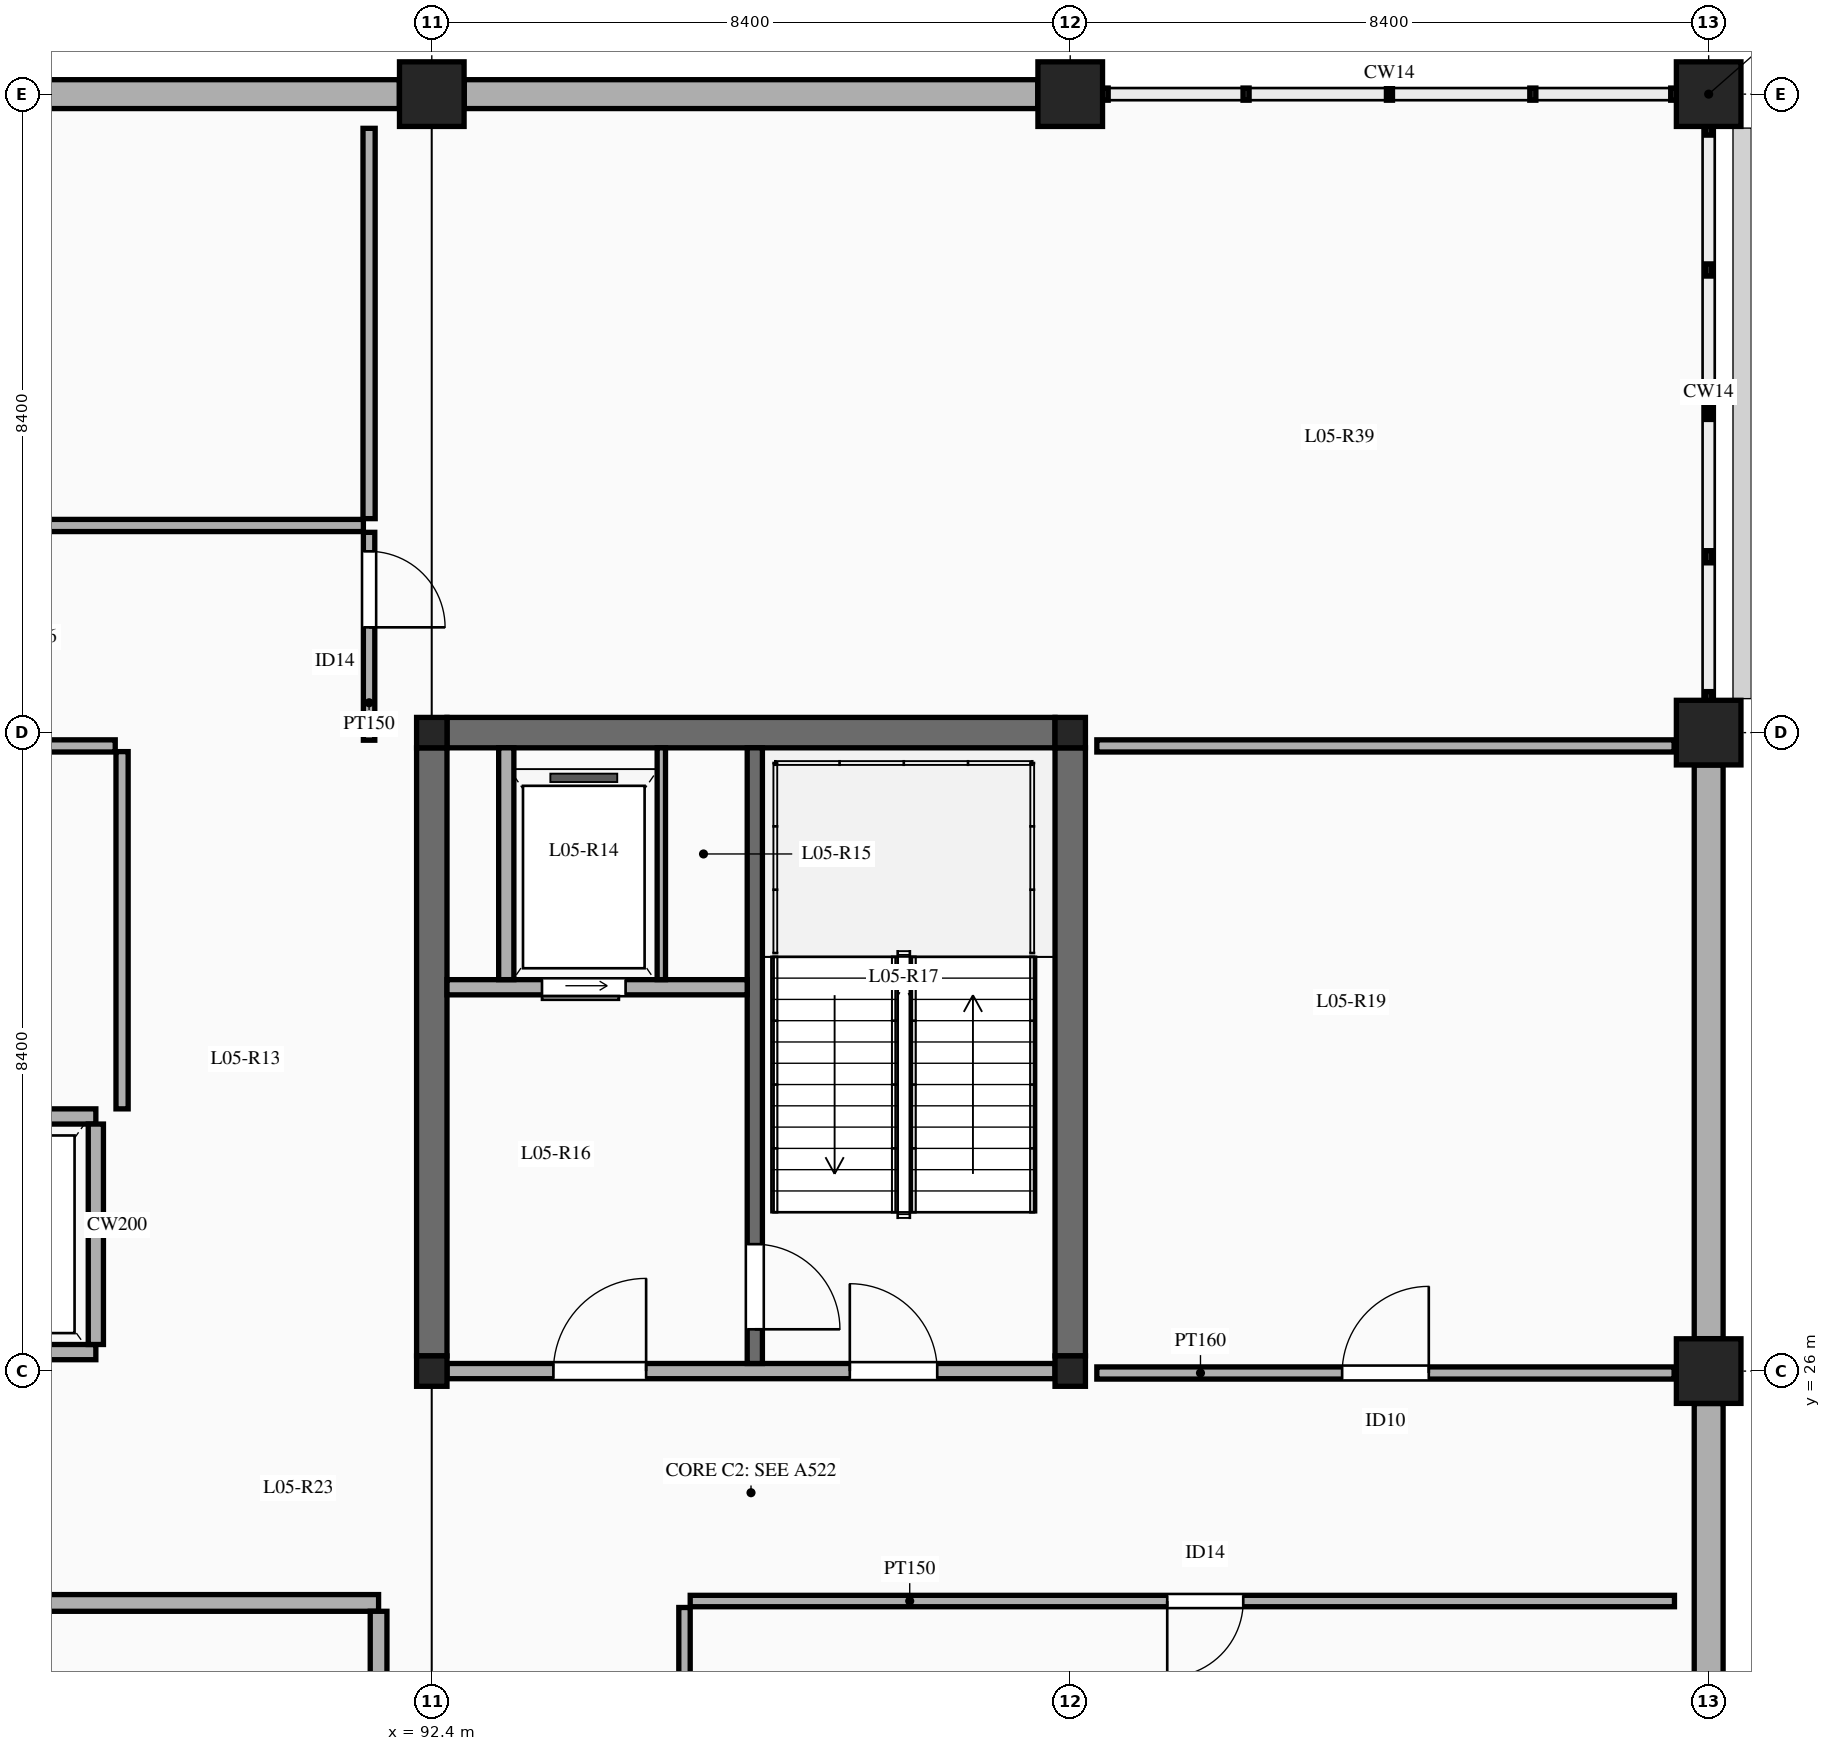
"""IFC4 building model, lengths in metres.
Left out: names, types, materials, properties, quantities, classifications, styles, units other than length and angle.
Written with IfcOpenShell. Run it as: python <this file> out.ifc"""

import sys

from ifc_helpers import new_model, si_unit, direction, frame, frame_2d, origin, origin_2d, place, context, subcontext, project, spatial, rectangle, extrude, element, fill, save


model = new_model("IFC4")
c1 = context("Model", 3, precision=1e-05, world=origin(), true_north=direction((0.0, 1.0)))
c2 = subcontext(c1, "Body", "Model", "MODEL_VIEW")
j1 = project(units=[si_unit("LENGTHUNIT", "METRE"), si_unit("PLANEANGLEUNIT", "RADIAN")], contexts=[c1])
p1 = place(None, origin())
s1 = spatial("IfcSite", under=j1, at=p1, CompositionType="ELEMENT")
p2 = place(p1, origin())
s2 = spatial("IfcBuilding", under=s1, at=p2, CompositionType="ELEMENT")
p3 = place(p2, frame((0.0, 0.0, 24.0)))
s3 = spatial("IfcBuildingStorey", under=s2, at=p3, CompositionType="ELEMENT", Elevation=24.0)
for number, where, z_axis, x_axis in (
    (1, (92.4, 26.0, 0.0), (0.0, 0.0, 1.0), (1.0, 0.0, 0.0)),
    (2, (92.4, 34.4, 0.0), (0.0, 0.0, 1.0), (1.0, 0.0, 0.0)),
):
    element("IfcColumn", number, at=place(p3, frame(where, z_axis=z_axis, x_axis=x_axis)), inside=s3, PredefinedType="COLUMN", context=c2, shape_type="SweptSolid", body=[
        extrude(rectangle(XDim=0.4, YDim=0.4, at=origin_2d()), origin(), (0.0, 0.0, 1.0), 4.5),
    ])
p4 = place(p3, frame((92.4, 42.8, 0.0), z_axis=(0.0, 0.0, 1.0), x_axis=(1.0, 0.0, 0.0)))
e3 = element("IfcColumn", 3, at=p4, inside=s3, PredefinedType="COLUMN", context=c2, shape_type="SweptSolid", body=[
    extrude(rectangle(XDim=0.85, YDim=0.85, at=origin_2d()), origin(), (0.0, 0.0, 1.0), 4.5),
])
for number, where, z_axis, x_axis in (
    (4, (100.8, 26.0, 0.0), (0.0, 0.0, 1.0), (1.0, 0.0, 0.0)),
    (5, (100.8, 34.4, 0.0), (0.0, 0.0, 1.0), (1.0, 0.0, 0.0)),
):
    element("IfcColumn", number, at=place(p3, frame(where, z_axis=z_axis, x_axis=x_axis)), inside=s3, PredefinedType="COLUMN", context=c2, shape_type="SweptSolid", body=[
        extrude(rectangle(XDim=0.4, YDim=0.4, at=origin_2d()), origin(), (0.0, 0.0, 1.0), 4.5),
    ])
for number, where, z_axis, x_axis in (
    (6, (100.8, 42.8, 0.0), (0.0, 0.0, 1.0), (1.0, 0.0, 0.0)),
    (7, (109.2, 26.0, 0.0), (0.0, 0.0, 1.0), (1.0, 0.0, 0.0)),
    (8, (109.2, 34.4, 0.0), (0.0, 0.0, 1.0), (1.0, 0.0, 0.0)),
    (9, (109.2, 42.8, 0.0), (0.0, 0.0, 1.0), (1.0, 0.0, 0.0)),
):
    element("IfcColumn", number, at=place(p3, frame(where, z_axis=z_axis, x_axis=x_axis)), inside=s3, PredefinedType="COLUMN", context=c2, shape_type="SweptSolid", body=[
        extrude(rectangle(XDim=0.85, YDim=0.85, at=origin_2d()), origin(), (0.0, 0.0, 1.0), 4.5),
    ])
for number, where, z_axis, x_axis in (
    (10, (92.4, 26.2, 0.0), (0.0, 0.0, 1.0), (0.0, 1.0, 0.0)),
    (11, (100.8, 26.2, 0.0), (0.0, 0.0, 1.0), (0.0, 1.0, 0.0)),
    (12, (92.6, 34.4, 0.0), (0.0, 0.0, 1.0), (1.0, 0.0, 0.0)),
):
    element("IfcWall", number, at=place(p3, frame(where, z_axis=z_axis, x_axis=x_axis)), inside=s3, PredefinedType="SHEAR", context=c2, shape_type="SweptSolid", body=[
        extrude(rectangle(XDim=8.0, YDim=0.4, at=frame_2d((4.0, 0.0))), origin(), (0.0, 0.0, 1.0), 4.5),
    ])
p5 = place(p3, frame((84.427, 42.8, 0.0), z_axis=(0.0, 0.0, 1.0), x_axis=(1.0, 0.0, 0.0)))
e13 = element("IfcWall", 13, at=p5, inside=s3, PredefinedType="SOLIDWALL", context=c2, shape_type="SweptSolid", body=[
    extrude(rectangle(XDim=7.546, YDim=0.38, at=frame_2d((3.773, 0.0))), origin(), (0.0, 0.0, 1.0), 3.55),
])
p6 = place(p3, frame((92.827, 42.8, 0.0), z_axis=(0.0, 0.0, 1.0), x_axis=(1.0, 0.0, 0.0)))
e14 = element("IfcWall", 14, at=p6, inside=s3, PredefinedType="SOLIDWALL", context=c2, shape_type="SweptSolid", body=[
    extrude(rectangle(XDim=7.546, YDim=0.38, at=frame_2d((3.773, 0.0))), origin(), (0.0, 0.0, 1.0), 3.55),
])
for number, where, z_axis, x_axis in (
    (15, (109.2, 18.027, 0.0), (0.0, 0.0, 1.0), (0.0, 1.0, 0.0)),
    (16, (109.2, 26.427, 0.0), (0.0, 0.0, 1.0), (0.0, 1.0, 0.0)),
):
    element("IfcWall", number, at=place(p3, frame(where, z_axis=z_axis, x_axis=x_axis)), inside=s3, PredefinedType="SOLIDWALL", context=c2, shape_type="SweptSolid", body=[
        extrude(rectangle(XDim=7.546, YDim=0.38, at=frame_2d((3.773, 0.0))), origin(), (0.0, 0.0, 1.0), 3.55),
    ])
p7 = place(p3, frame((92.6, 26.0, 0.0), z_axis=(0.0, 0.0, 1.0), x_axis=(1.0, 0.0, 0.0)))
e17 = element("IfcWall", 17, at=p7, inside=s3, PredefinedType="SOLIDWALL", context=c2, shape_type="SweptSolid", body=[
    extrude(rectangle(XDim=8.0, YDim=0.2, at=frame_2d((4.0, 0.0))), origin(), (0.0, 0.0, 1.0), 3.58),
])
p8 = place(p7, frame((1.4, 0.0, 0.0)))
e18 = element("IfcOpeningElement", 18, at=p8, cuts=e17, PredefinedType="OPENING", context=c2, shape_type="SweptSolid", body=[
    extrude(rectangle(XDim=1.22, YDim=2.15, at=frame_2d((0.61, 1.075))), frame((0.0, 0.11, 0.0), z_axis=(0.0, -1.0, 0.0), x_axis=(1.0, 0.0, 0.0)), (0.0, 0.0, 1.0), 0.22),
])
p9 = place(p7, frame((5.3, 0.0, 0.0)))
e19 = element("IfcOpeningElement", 19, at=p9, cuts=e17, PredefinedType="OPENING", context=c2, shape_type="SweptSolid", body=[
    extrude(rectangle(XDim=1.15, YDim=2.15, at=frame_2d((0.575, 1.075))), frame((0.0, 0.11, 0.0), z_axis=(0.0, -1.0, 0.0), x_axis=(1.0, 0.0, 0.0)), (0.0, 0.0, 1.0), 0.22),
])
p10 = place(p3, frame((96.65, 26.1, 0.0), z_axis=(0.0, 0.0, 1.0), x_axis=(0.0, 1.0, 0.0)))
e20 = element("IfcWall", 20, at=p10, inside=s3, PredefinedType="SOLIDWALL", context=c2, shape_type="SweptSolid", body=[
    extrude(rectangle(XDim=8.1, YDim=0.2, at=frame_2d((4.05, 0.0))), origin(), (0.0, 0.0, 1.0), 4.25),
])
p11 = place(p10, frame((0.45, 0.0, 0.0)))
e21 = element("IfcOpeningElement", 21, at=p11, cuts=e20, PredefinedType="OPENING", context=c2, shape_type="SweptSolid", body=[
    extrude(rectangle(XDim=1.12, YDim=2.15, at=frame_2d((0.56, 1.075))), frame((0.0, 0.11, 0.0), z_axis=(0.0, -1.0, 0.0), x_axis=(1.0, 0.0, 0.0)), (0.0, 0.0, 1.0), 0.22),
])
p12 = place(p3, frame((92.6, 31.05, 0.0), z_axis=(0.0, 0.0, 1.0), x_axis=(1.0, 0.0, 0.0)))
e22 = element("IfcWall", 22, at=p12, inside=s3, PredefinedType="SOLIDWALL", context=c2, shape_type="SweptSolid", body=[
    extrude(rectangle(XDim=3.95, YDim=0.2, at=frame_2d((1.975, 0.0))), origin(), (0.0, 0.0, 1.0), 4.25),
])
p13 = place(p12, frame((1.25, 0.0, 0.0)))
e23 = element("IfcOpeningElement", 23, at=p13, cuts=e22, PredefinedType="OPENING", context=c2, shape_type="SweptSolid", body=[
    extrude(rectangle(XDim=1.1, YDim=2.15, at=frame_2d((0.55, 1.075))), frame((0.0, 0.11, 0.0), z_axis=(0.0, -1.0, 0.0), x_axis=(1.0, 0.0, 0.0)), (0.0, 0.0, 1.0), 0.22),
])
p14 = place(p3, frame((95.42, 31.15, 0.0), z_axis=(0.0, 0.0, 1.0), x_axis=(0.0, 1.0, 0.0)))
e24 = element("IfcWall", 24, at=p14, inside=s3, PredefinedType="PARTITIONING", context=c2, shape_type="SweptSolid", body=[
    extrude(rectangle(XDim=3.05, YDim=0.11, at=frame_2d((1.525, 0.0))), origin(), (0.0, 0.0, 1.0), 4.25),
])
p15 = place(p3, frame((93.38, 31.15, 0.0), z_axis=(0.0, 0.0, 1.0), x_axis=(0.0, 1.0, 0.0)))
e25 = element("IfcWall", 25, at=p15, inside=s3, PredefinedType="SOLIDWALL", context=c2, shape_type="SweptSolid", body=[
    extrude(rectangle(XDim=3.05, YDim=0.2, at=frame_2d((1.525, 0.0))), origin(), (0.0, 0.0, 1.0), 4.25),
])
p16 = place(p3, frame((85.62, 26.25, 0.0), z_axis=(0.0, 0.0, 1.0), x_axis=(1.0, 0.0, 0.0)))
e26 = element("IfcWall", 26, at=p16, inside=s3, PredefinedType="SOLIDWALL", context=c2, shape_type="SweptSolid", body=[
    extrude(rectangle(XDim=2.36, YDim=0.2, at=frame_2d((1.18, 0.0))), origin(), (0.0, 0.0, 1.0), 3.58),
])
p17 = place(p16, frame((0.605, 0.0, 0.0)))
e27 = element("IfcOpeningElement", 27, at=p17, cuts=e26, PredefinedType="OPENING", context=c2, shape_type="SweptSolid", body=[
    extrude(rectangle(XDim=1.15, YDim=2.2, at=frame_2d((0.575, 1.1))), frame((0.0, 0.11, 0.0), z_axis=(0.0, -1.0, 0.0), x_axis=(1.0, 0.0, 0.0)), (0.0, 0.0, 1.0), 0.22),
])
p18 = place(p3, frame((85.62, 29.35, 0.0), z_axis=(0.0, 0.0, 1.0), x_axis=(1.0, 0.0, 0.0)))
e28 = element("IfcWall", 28, at=p18, inside=s3, PredefinedType="SOLIDWALL", context=c2, shape_type="SweptSolid", body=[
    extrude(rectangle(XDim=2.36, YDim=0.2, at=frame_2d((1.18, 0.0))), origin(), (0.0, 0.0, 1.0), 4.25),
])
p19 = place(p3, frame((87.98, 26.35, 0.0), z_axis=(0.0, 0.0, 1.0), x_axis=(0.0, 1.0, 0.0)))
e29 = element("IfcWall", 29, at=p19, inside=s3, PredefinedType="SOLIDWALL", context=c2, shape_type="SweptSolid", body=[
    extrude(rectangle(XDim=2.9, YDim=0.2, at=frame_2d((1.45, 0.0))), origin(), (0.0, 0.0, 1.0), 3.88),
])
p20 = place(p3, frame((59.5, 22.95, 0.0), z_axis=(0.0, 0.0, 1.0), x_axis=(1.0, 0.0, 0.0)))
e30 = element("IfcWall", 30, at=p20, inside=s3, PredefinedType="SOLIDWALL", context=c2, shape_type="SweptSolid", body=[
    extrude(rectangle(XDim=32.2, YDim=0.22, at=frame_2d((16.1, 0.0))), origin(), (0.0, 0.0, 1.0), 3.45),
])
p21 = place(p20, frame((3.0, 0.0, 0.0)))
e31 = element("IfcOpeningElement", 31, at=p21, cuts=e30, PredefinedType="OPENING", context=c2, shape_type="SweptSolid", body=[
    extrude(rectangle(XDim=1.2, YDim=2.2, at=frame_2d((0.6, 1.1))), frame((0.0, 0.12, 0.0), z_axis=(0.0, -1.0, 0.0), x_axis=(1.0, 0.0, 0.0)), (0.0, 0.0, 1.0), 0.24),
])
p22 = place(p3, frame((91.7, 17.01, 0.0), z_axis=(0.0, 0.0, 1.0), x_axis=(0.0, 1.0, 0.0)))
e32 = element("IfcWall", 32, at=p22, inside=s3, PredefinedType="SOLIDWALL", context=c2, shape_type="SweptSolid", body=[
    extrude(rectangle(XDim=5.83, YDim=0.22, at=frame_2d((2.915, 0.0))), origin(), (0.0, 0.0, 1.0), 3.45),
])
p23 = place(p3, frame((88.325, 29.45, 0.0), z_axis=(0.0, 0.0, 1.0), x_axis=(0.0, 1.0, 0.0)))
e33 = element("IfcWall", 33, at=p23, inside=s3, PredefinedType="PARTITIONING", context=c2, shape_type="SweptSolid", body=[
    extrude(rectangle(XDim=4.7, YDim=0.16, at=frame_2d((2.35, 0.0))), origin(), (0.0, 0.0, 1.0), 3.45),
])
p24 = place(p3, frame((84.48, 34.225, 0.0), z_axis=(0.0, 0.0, 1.0), x_axis=(1.0, 0.0, 0.0)))
e34 = element("IfcWall", 34, at=p24, inside=s3, PredefinedType="PARTITIONING", context=c2, shape_type="SweptSolid", body=[
    extrude(rectangle(XDim=3.755, YDim=0.16, at=frame_2d((1.877, 0.0))), origin(), (0.0, 0.0, 1.0), 3.45),
])
p25 = place(p3, frame((101.15, 25.975, 0.0), z_axis=(0.0, 0.0, 1.0), x_axis=(1.0, 0.0, 0.0)))
e35 = element("IfcWall", 35, at=p25, inside=s3, PredefinedType="PARTITIONING", context=c2, shape_type="SweptSolid", body=[
    extrude(rectangle(XDim=7.595, YDim=0.16, at=frame_2d((3.798, 0.0))), origin(), (0.0, 0.0, 1.0), 3.45),
])
p26 = place(p25, frame((3.228, 0.0, 0.0)))
e36 = element("IfcOpeningElement", 36, at=p26, cuts=e35, PredefinedType="OPENING", context=c2, shape_type="SweptSolid", body=[
    extrude(rectangle(XDim=1.14, YDim=2.22, at=frame_2d((0.57, 1.11))), frame((0.0, 0.09, 0.0), z_axis=(0.0, -1.0, 0.0), x_axis=(1.0, 0.0, 0.0)), (0.0, 0.0, 1.0), 0.18),
])
p27 = place(p3, frame((101.15, 34.225, 0.0), z_axis=(0.0, 0.0, 1.0), x_axis=(1.0, 0.0, 0.0)))
e37 = element("IfcWall", 37, at=p27, inside=s3, PredefinedType="PARTITIONING", context=c2, shape_type="SweptSolid", body=[
    extrude(rectangle(XDim=7.595, YDim=0.16, at=frame_2d((3.798, 0.0))), origin(), (0.0, 0.0, 1.0), 3.45),
])
p28 = place(p3, frame((95.8, 22.975, 0.0), z_axis=(0.0, 0.0, 1.0), x_axis=(1.0, 0.0, 0.0)))
e38 = element("IfcWall", 38, at=p28, inside=s3, PredefinedType="PARTITIONING", context=c2, shape_type="SweptSolid", body=[
    extrude(rectangle(XDim=12.95, YDim=0.15, at=frame_2d((6.475, 0.0))), origin(), (0.0, 0.0, 1.0), 3.45),
])
p29 = place(p28, frame((6.276, 0.0, 0.0)))
e39 = element("IfcOpeningElement", 39, at=p29, cuts=e38, PredefinedType="OPENING", context=c2, shape_type="SweptSolid", body=[
    extrude(rectangle(XDim=1.0, YDim=2.15, at=frame_2d((0.5, 1.075))), frame((0.0, 0.085, 0.0), z_axis=(0.0, -1.0, 0.0), x_axis=(1.0, 0.0, 0.0)), (0.0, 0.0, 1.0), 0.17),
])
p30 = place(p3, frame((95.725, 14.2, 0.0), z_axis=(0.0, 0.0, 1.0), x_axis=(0.0, 1.0, 0.0)))
e40 = element("IfcWall", 40, at=p30, inside=s3, PredefinedType="PARTITIONING", context=c2, shape_type="SweptSolid", body=[
    extrude(rectangle(XDim=8.69, YDim=0.15, at=frame_2d((4.345, 0.0))), origin(), (0.0, 0.0, 1.0), 3.45),
])
p31 = place(p3, frame((67.91, 37.125, 0.0), z_axis=(0.0, 0.0, 1.0), x_axis=(1.0, 0.0, 0.0)))
e41 = element("IfcWall", 41, at=p31, inside=s3, PredefinedType="PARTITIONING", context=c2, shape_type="SweptSolid", body=[
    extrude(rectangle(XDim=23.59, YDim=0.16, at=frame_2d((11.795, 0.0))), origin(), (0.0, 0.0, 1.0), 3.45),
])
p32 = place(p31, frame((11.215, 0.0, 0.0)))
e42 = element("IfcOpeningElement", 42, at=p32, cuts=e41, PredefinedType="OPENING", context=c2, shape_type="SweptSolid", body=[
    extrude(rectangle(XDim=1.16, YDim=2.2, at=frame_2d((0.58, 1.1))), frame((0.0, 0.09, 0.0), z_axis=(0.0, -1.0, 0.0), x_axis=(1.0, 0.0, 0.0)), (0.0, 0.0, 1.0), 0.18),
])
p33 = place(p3, frame((91.575, 34.3, 0.0), z_axis=(0.0, 0.0, 1.0), x_axis=(0.0, 1.0, 0.0)))
e43 = element("IfcWall", 43, at=p33, inside=s3, PredefinedType="PARTITIONING", context=c2, shape_type="SweptSolid", body=[
    extrude(rectangle(XDim=2.735, YDim=0.15, at=frame_2d((1.367, 0.0))), origin(), (0.0, 0.0, 1.0), 3.45),
])
p34 = place(p33, frame((1.485, 0.0, 0.0)))
e44 = element("IfcOpeningElement", 44, at=p34, cuts=e43, PredefinedType="OPENING", context=c2, shape_type="SweptSolid", body=[
    extrude(rectangle(XDim=1.0, YDim=2.15, at=frame_2d((0.5, 1.075))), frame((0.0, 0.085, 0.0), z_axis=(0.0, -1.0, 0.0), x_axis=(1.0, 0.0, 0.0)), (0.0, 0.0, 1.0), 0.17),
])
p35 = place(p3, frame((91.575, 37.215, 0.0), z_axis=(0.0, 0.0, 1.0), x_axis=(0.0, 1.0, 0.0)))
e45 = element("IfcWall", 45, at=p35, inside=s3, PredefinedType="PARTITIONING", context=c2, shape_type="SweptSolid", body=[
    extrude(rectangle(XDim=5.135, YDim=0.16, at=frame_2d((2.567, 0.0))), origin(), (0.0, 0.0, 1.0), 3.45),
])
p36 = place(p8, origin())
e46 = element("IfcDoor", 46, at=p36, inside=s3, OperationType="SINGLE_SWING_RIGHT", PredefinedType="DOOR", context=c2, shape_type="SweptSolid", body=[
    extrude(rectangle(XDim=1.22, YDim=2.15, at=frame_2d((0.61, 1.075))), frame((0.0, 0.025, 0.0), z_axis=(0.0, -1.0, 0.0), x_axis=(1.0, 0.0, 0.0)), (0.0, 0.0, 1.0), 0.05),
])
fill(e18, e46)
p37 = place(p9, origin())
e47 = element("IfcDoor", 47, at=p37, inside=s3, OperationType="SINGLE_SWING_LEFT", PredefinedType="DOOR", context=c2, shape_type="SweptSolid", body=[
    extrude(rectangle(XDim=1.15, YDim=2.15, at=frame_2d((0.575, 1.075))), frame((0.0, 0.025, 0.0), z_axis=(0.0, -1.0, 0.0), x_axis=(1.0, 0.0, 0.0)), (0.0, 0.0, 1.0), 0.05),
])
fill(e19, e47)
p38 = place(p11, frame((1.12, 0.0, 0.0), z_axis=(0.0, 0.0, 1.0), x_axis=(-1.0, 0.0, 0.0)))
e48 = element("IfcDoor", 48, at=p38, inside=s3, OperationType="SINGLE_SWING_RIGHT", PredefinedType="DOOR", context=c2, shape_type="SweptSolid", body=[
    extrude(rectangle(XDim=1.12, YDim=2.15, at=frame_2d((0.56, 1.075))), frame((0.0, 0.025, 0.0), z_axis=(0.0, -1.0, 0.0), x_axis=(1.0, 0.0, 0.0)), (0.0, 0.0, 1.0), 0.05),
])
fill(e21, e48)
p39 = place(p13, frame((1.1, 0.0, 0.0), z_axis=(0.0, 0.0, 1.0), x_axis=(-1.0, 0.0, 0.0)))
e49 = element("IfcDoor", 49, at=p39, inside=s3, OperationType="SLIDING_TO_LEFT", PredefinedType="DOOR", context=c2, shape_type="SweptSolid", body=[
    extrude(rectangle(XDim=1.1, YDim=2.15, at=frame_2d((0.55, 1.075))), frame((0.0, 0.025, 0.0), z_axis=(0.0, -1.0, 0.0), x_axis=(1.0, 0.0, 0.0)), (0.0, 0.0, 1.0), 0.05),
])
fill(e23, e49)
p40 = place(p26, origin())
e50 = element("IfcDoor", 50, at=p40, inside=s3, OperationType="SINGLE_SWING_RIGHT", PredefinedType="DOOR", context=c2, shape_type="SweptSolid", body=[
    extrude(rectangle(XDim=1.14, YDim=2.22, at=frame_2d((0.57, 1.11))), frame((0.0, 0.025, 0.0), z_axis=(0.0, -1.0, 0.0), x_axis=(1.0, 0.0, 0.0)), (0.0, 0.0, 1.0), 0.05),
])
fill(e36, e50)
p41 = place(p29, frame((1.0, 0.0, 0.0), z_axis=(0.0, 0.0, 1.0), x_axis=(-1.0, 0.0, 0.0)))
e51 = element("IfcDoor", 51, at=p41, inside=s3, OperationType="SINGLE_SWING_RIGHT", PredefinedType="DOOR", context=c2, shape_type="SweptSolid", body=[
    extrude(rectangle(XDim=1.0, YDim=2.15, at=frame_2d((0.5, 1.075))), frame((0.0, 0.025, 0.0), z_axis=(0.0, -1.0, 0.0), x_axis=(1.0, 0.0, 0.0)), (0.0, 0.0, 1.0), 0.05),
])
fill(e39, e51)
p42 = place(p34, frame((1.0, 0.0, 0.0), z_axis=(0.0, 0.0, 1.0), x_axis=(-1.0, 0.0, 0.0)))
e52 = element("IfcDoor", 52, at=p42, inside=s3, OperationType="SINGLE_SWING_RIGHT", PredefinedType="DOOR", context=c2, shape_type="SweptSolid", body=[
    extrude(rectangle(XDim=1.0, YDim=2.15, at=frame_2d((0.5, 1.075))), frame((0.0, 0.025, 0.0), z_axis=(0.0, -1.0, 0.0), x_axis=(1.0, 0.0, 0.0)), (0.0, 0.0, 1.0), 0.05),
])
fill(e44, e52)
save(model, sys.argv[1])
